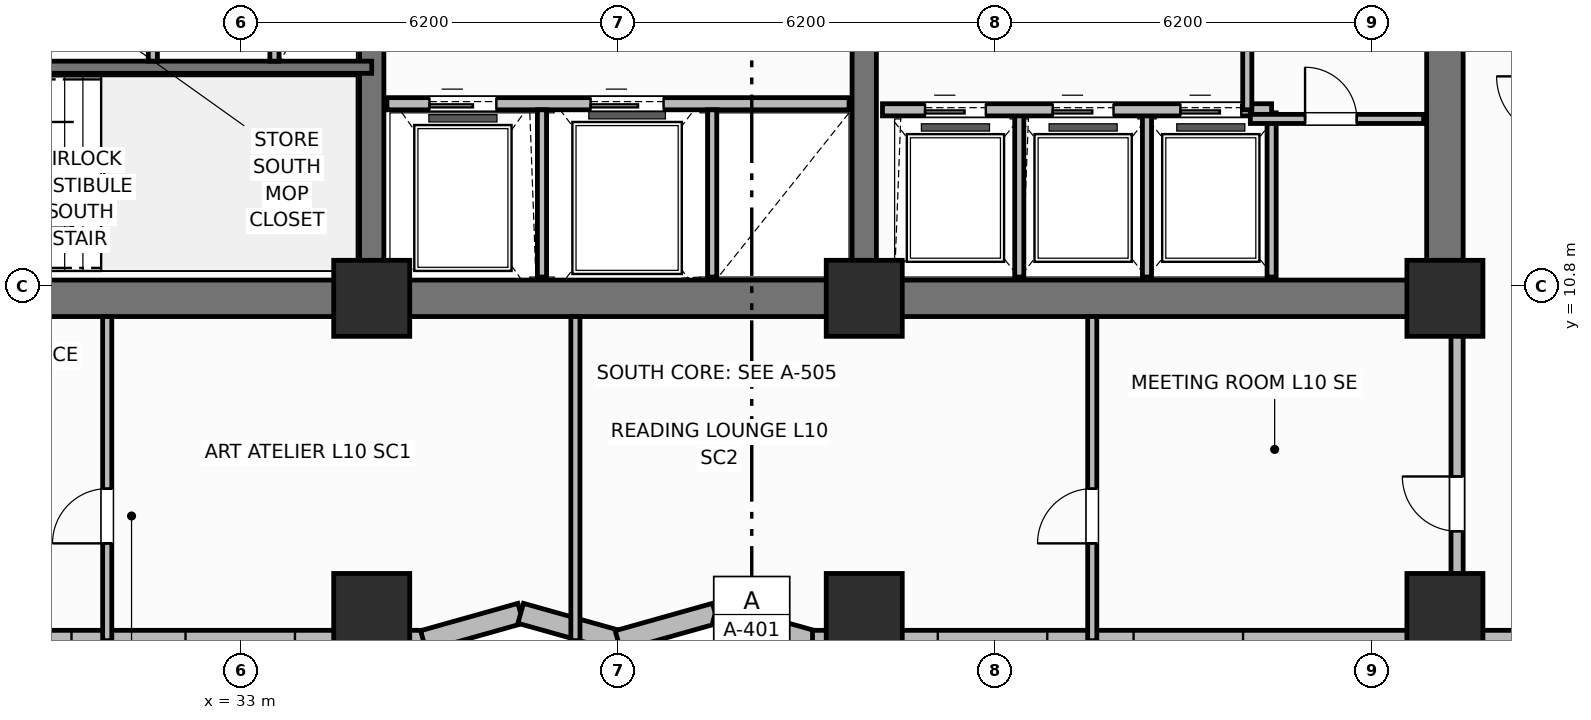
"""IFC4 building model, lengths in metres.
Left out: names, types, materials, properties, quantities, classifications, styles, units other than length and angle.
Written with IfcOpenShell. Run it as: python <this file> out.ifc"""

import sys

from ifc_helpers import new_model, si_unit, direction, frame, frame_2d, origin, origin_2d, place, context, subcontext, project, spatial, rectangle, extrude, element, fill, save


model = new_model("IFC4")
c1 = context("Model", 3, precision=1e-05, world=origin(), true_north=direction((0.0, 1.0)))
c2 = subcontext(c1, "Body", "Model", "MODEL_VIEW")
j1 = project(units=[si_unit("LENGTHUNIT", "METRE"), si_unit("PLANEANGLEUNIT", "RADIAN")], contexts=[c1])
p1 = place(None, origin())
s1 = spatial("IfcSite", under=j1, at=p1, CompositionType="ELEMENT")
p2 = place(p1, origin())
s2 = spatial("IfcBuilding", under=s1, at=p2, CompositionType="ELEMENT")
p3 = place(p2, frame((0.0, 0.0, 43.6)))
s3 = spatial("IfcBuildingStorey", under=s2, at=p3, CompositionType="ELEMENT", Elevation=43.6)
p4 = place(p3, frame((52.8, 10.6, 0.0), z_axis=(0.0, 0.0, 1.0), x_axis=(-1.0, 0.0, 0.0)))
e1 = element("IfcWall", 1, at=p4, inside=s3, PredefinedType="SHEAR", context=c2, shape_type="SweptSolid", body=[
    extrude(rectangle(XDim=27.2, YDim=0.6, at=frame_2d((13.6, 0.0))), origin(), (0.0, 0.0, 1.0), 3.7),
])
p5 = place(p3, frame((52.8, 10.9, 0.0), z_axis=(0.0, 0.0, 1.0), x_axis=(0.0, 1.0, 0.0)))
e2 = element("IfcWall", 2, at=p5, inside=s3, PredefinedType="SHEAR", context=c2, shape_type="SweptSolid", body=[
    extrude(rectangle(XDim=5.6, YDim=0.6, at=frame_2d((2.8, 0.0))), origin(), (0.0, 0.0, 1.0), 3.7),
])
for number, where, z_axis, x_axis in (
    (3, (35.15, 10.9, 0.0), (0.0, 0.0, 1.0), (0.0, 1.0, 0.0)),
    (4, (43.25, 10.9, 0.0), (0.0, 0.0, 1.0), (0.0, 1.0, 0.0)),
):
    element("IfcWall", number, at=place(p3, frame(where, z_axis=z_axis, x_axis=x_axis)), inside=s3, PredefinedType="SHEAR", context=c2, shape_type="SweptSolid", body=[
        extrude(rectangle(XDim=5.6, YDim=0.4, at=frame_2d((2.8, 0.0))), origin(), (0.0, 0.0, 1.0), 3.7),
    ])
for number, where, z_axis, x_axis in (
    (5, (35.15, 10.6, 0.0), (0.0, 0.0, 1.0), (1.0, 0.0, 0.0)),
    (6, (43.25, 10.6, 0.0), (0.0, 0.0, 1.0), (1.0, 0.0, 0.0)),
    (7, (52.8, 10.6, 0.0), (0.0, 0.0, 1.0), (1.0, 0.0, 0.0)),
    (8, (35.15, 5.45, 0.0), (0.0, 0.0, 1.0), (1.0, 0.0, 0.0)),
    (9, (43.25, 5.45, 0.0), (0.0, 0.0, 1.0), (1.0, 0.0, 0.0)),
    (10, (52.8, 5.45, 0.0), (0.0, 0.0, 1.0), (1.0, 0.0, 0.0)),
):
    element("IfcColumn", number, at=place(p3, frame(where, z_axis=z_axis, x_axis=x_axis)), inside=s3, PredefinedType="COLUMN", context=c2, shape_type="SweptSolid", body=[
        extrude(rectangle(XDim=1.25, YDim=1.25, at=origin_2d()), origin(), (0.0, 0.0, 1.0), 3.7),
    ])
p6 = place(p3, frame((18.6, 4.97, 0.0), z_axis=(0.0, 0.0, 1.0), x_axis=(1.0, 0.0, 0.0)))
e11 = element("IfcWall", 11, at=p6, inside=s3, PredefinedType="SOLIDWALL", context=c2, shape_type="SweptSolid", body=[
    extrude(rectangle(XDim=17.4, YDim=0.34, at=frame_2d((8.7, 0.0))), origin(), (0.0, 0.0, 1.0), 2.7),
])
p7 = place(p6, frame((1.762, 0.0, 0.73)))
e12 = element("IfcOpeningElement", 12, at=p7, cuts=e11, PredefinedType="OPENING", context=c2, shape_type="SweptSolid", body=[
    extrude(rectangle(XDim=1.8, YDim=1.85, at=frame_2d((0.9, 0.925))), frame((0.0, 0.18, 0.0), z_axis=(0.0, -1.0, 0.0), x_axis=(1.0, 0.0, 0.0)), (0.0, 0.0, 1.0), 0.36),
])
p8 = place(p6, frame((9.812, 0.0, 0.73)))
e13 = element("IfcOpeningElement", 13, at=p8, cuts=e11, PredefinedType="OPENING", context=c2, shape_type="SweptSolid", body=[
    extrude(rectangle(XDim=1.8, YDim=1.85, at=frame_2d((0.9, 0.925))), frame((0.0, 0.18, 0.0), z_axis=(0.0, -1.0, 0.0), x_axis=(1.0, 0.0, 0.0)), (0.0, 0.0, 1.0), 0.36),
])
p9 = place(p6, frame((13.488, 0.0, 0.73)))
e14 = element("IfcOpeningElement", 14, at=p9, cuts=e11, PredefinedType="OPENING", context=c2, shape_type="SweptSolid", body=[
    extrude(rectangle(XDim=1.8, YDim=1.85, at=frame_2d((0.9, 0.925))), frame((0.0, 0.18, 0.0), z_axis=(0.0, -1.0, 0.0), x_axis=(1.0, 0.0, 0.0)), (0.0, 0.0, 1.0), 0.36),
])
p10 = place(p3, frame((36.0, 4.97, 0.0), z_axis=(0.0, 0.0, 1.0), x_axis=(0.962662902433, 0.270703040766, 0.0)))
e15 = element("IfcWall", 15, at=p10, inside=s3, PredefinedType="SOLIDWALL", context=c2, shape_type="SweptSolid", body=[
    extrude(rectangle(XDim=1.662, YDim=0.34, at=frame_2d((0.831, 0.0))), origin(), (0.0, 0.0, 1.0), 2.7),
])
p11 = place(p3, frame((37.6, 5.42, 0.0), z_axis=(0.0, 0.0, 1.0), x_axis=(0.962652136636, -0.270741322725, 0.0)))
e16 = element("IfcWall", 16, at=p11, inside=s3, PredefinedType="SOLIDWALL", context=c2, shape_type="SweptSolid", body=[
    extrude(rectangle(XDim=1.662, YDim=0.34, at=frame_2d((0.831, 0.0))), origin(), (0.0, 0.0, 1.0), 2.7),
])
p12 = place(p3, frame((39.2, 4.97, 0.0), z_axis=(0.0, 0.0, 1.0), x_axis=(0.962662902433, 0.270703040766, 0.0)))
e17 = element("IfcWall", 17, at=p12, inside=s3, PredefinedType="SOLIDWALL", context=c2, shape_type="SweptSolid", body=[
    extrude(rectangle(XDim=1.662, YDim=0.34, at=frame_2d((0.831, 0.0))), origin(), (0.0, 0.0, 1.0), 2.7),
])
p13 = place(p3, frame((40.8, 5.42, 0.0), z_axis=(0.0, 0.0, 1.0), x_axis=(0.962652136636, -0.270741322725, 0.0)))
e18 = element("IfcWall", 18, at=p13, inside=s3, PredefinedType="SOLIDWALL", context=c2, shape_type="SweptSolid", body=[
    extrude(rectangle(XDim=1.662, YDim=0.34, at=frame_2d((0.831, 0.0))), origin(), (0.0, 0.0, 1.0), 2.7),
])
p14 = place(p3, frame((42.4, 4.97, 0.0), z_axis=(0.0, 0.0, 1.0), x_axis=(1.0, 0.0, 0.0)))
e19 = element("IfcWall", 19, at=p14, inside=s3, PredefinedType="SOLIDWALL", context=c2, shape_type="SweptSolid", body=[
    extrude(rectangle(XDim=17.4, YDim=0.34, at=frame_2d((8.7, 0.0))), origin(), (0.0, 0.0, 1.0), 2.7),
])
p15 = place(p14, frame((2.06, 0.0, 0.73)))
e20 = element("IfcOpeningElement", 20, at=p15, cuts=e19, PredefinedType="OPENING", context=c2, shape_type="SweptSolid", body=[
    extrude(rectangle(XDim=1.8, YDim=1.85, at=frame_2d((0.9, 0.925))), frame((0.0, 0.18, 0.0), z_axis=(0.0, -1.0, 0.0), x_axis=(1.0, 0.0, 0.0)), (0.0, 0.0, 1.0), 0.36),
])
p16 = place(p14, frame((5.28, 0.0, 0.73)))
e21 = element("IfcOpeningElement", 21, at=p16, cuts=e19, PredefinedType="OPENING", context=c2, shape_type="SweptSolid", body=[
    extrude(rectangle(XDim=1.8, YDim=1.85, at=frame_2d((0.9, 0.925))), frame((0.0, 0.18, 0.0), z_axis=(0.0, -1.0, 0.0), x_axis=(1.0, 0.0, 0.0)), (0.0, 0.0, 1.0), 0.36),
])
p17 = place(p14, frame((14.24, 0.0, 0.73)))
e22 = element("IfcOpeningElement", 22, at=p17, cuts=e19, PredefinedType="OPENING", context=c2, shape_type="SweptSolid", body=[
    extrude(rectangle(XDim=1.8, YDim=1.85, at=frame_2d((0.9, 0.925))), frame((0.0, 0.18, 0.0), z_axis=(0.0, -1.0, 0.0), x_axis=(1.0, 0.0, 0.0)), (0.0, 0.0, 1.0), 0.36),
])
p18 = place(p3, frame((25.6, 14.4, 0.0), z_axis=(0.0, 0.0, 1.0), x_axis=(1.0, 0.0, 0.0)))
e23 = element("IfcWall", 23, at=p18, inside=s3, PredefinedType="SHEAR", context=c2, shape_type="SweptSolid", body=[
    extrude(rectangle(XDim=9.55, YDim=0.2, at=frame_2d((4.775, 0.0))), origin(), (0.0, 0.0, 1.0), 3.7),
])
p19 = place(p18, frame((1.05, 0.0, 0.0)))
e24 = element("IfcOpeningElement", 24, at=p19, cuts=e23, PredefinedType="OPENING", context=c2, shape_type="SweptSolid", body=[
    extrude(rectangle(XDim=1.1, YDim=2.15, at=frame_2d((0.55, 1.075))), frame((0.0, 0.11, 0.0), z_axis=(0.0, -1.0, 0.0), x_axis=(1.0, 0.0, 0.0)), (0.0, 0.0, 1.0), 0.22),
])
p20 = place(p3, frame((31.55, 14.5, 0.0), z_axis=(0.0, 0.0, 1.0), x_axis=(0.0, 1.0, 0.0)))
e25 = element("IfcWall", 25, at=p20, inside=s3, PredefinedType="PARTITIONING", context=c2, shape_type="SweptSolid", body=[
    extrude(rectangle(XDim=2.08, YDim=0.15, at=frame_2d((1.04, 0.0))), origin(), (0.0, 0.0, 1.0), 2.53),
])
p21 = place(p3, frame((33.55, 14.5, 0.0), z_axis=(0.0, 0.0, 1.0), x_axis=(0.0, 1.0, 0.0)))
e26 = element("IfcWall", 26, at=p21, inside=s3, PredefinedType="PARTITIONING", context=c2, shape_type="SweptSolid", body=[
    extrude(rectangle(XDim=2.08, YDim=0.15, at=frame_2d((1.04, 0.0))), origin(), (0.0, 0.0, 1.0), 2.53),
])
p22 = place(p21, frame((0.55, 0.0, 0.0)))
e27 = element("IfcOpeningElement", 27, at=p22, cuts=e26, PredefinedType="OPENING", context=c2, shape_type="SweptSolid", body=[
    extrude(rectangle(XDim=0.85, YDim=2.05, at=frame_2d((0.425, 1.025))), frame((0.0, 0.085, 0.0), z_axis=(0.0, -1.0, 0.0), x_axis=(1.0, 0.0, 0.0)), (0.0, 0.0, 1.0), 0.17),
])
p23 = place(p3, frame((35.4, 13.8, 0.0), z_axis=(0.0, 0.0, 1.0), x_axis=(1.0, 0.0, 0.0)))
e28 = element("IfcWall", 28, at=p23, inside=s3, PredefinedType="PARTITIONING", context=c2, shape_type="SweptSolid", body=[
    extrude(rectangle(XDim=7.6, YDim=0.2, at=frame_2d((3.8, 0.0))), origin(), (0.0, 0.0, 1.0), 2.3),
])
p24 = place(p23, frame((0.7, 0.0, 0.0)))
e29 = element("IfcOpeningElement", 29, at=p24, cuts=e28, PredefinedType="OPENING", context=c2, shape_type="SweptSolid", body=[
    extrude(rectangle(XDim=1.1, YDim=2.15, at=frame_2d((0.55, 1.075))), frame((0.0, 0.11, 0.0), z_axis=(0.0, -1.0, 0.0), x_axis=(1.0, 0.0, 0.0)), (0.0, 0.0, 1.0), 0.22),
])
p25 = place(p23, frame((3.35, 0.0, 0.0)))
e30 = element("IfcOpeningElement", 30, at=p25, cuts=e28, PredefinedType="OPENING", context=c2, shape_type="SweptSolid", body=[
    extrude(rectangle(XDim=1.2, YDim=2.15, at=frame_2d((0.6, 1.075))), frame((0.0, 0.11, 0.0), z_axis=(0.0, -1.0, 0.0), x_axis=(1.0, 0.0, 0.0)), (0.0, 0.0, 1.0), 0.22),
])
for number, where, z_axis, x_axis in (
    (31, (37.95, 10.95, 0.0), (0.0, 0.0, 1.0), (0.0, 1.0, 0.0)),
    (32, (40.75, 10.95, 0.0), (0.0, 0.0, 1.0), (0.0, 1.0, 0.0)),
):
    element("IfcWall", number, at=place(p3, frame(where, z_axis=z_axis, x_axis=x_axis)), inside=s3, PredefinedType="PARTITIONING", context=c2, shape_type="SweptSolid", body=[
        extrude(rectangle(XDim=2.75, YDim=0.15, at=frame_2d((1.375, 0.0))), origin(), (0.0, 0.0, 1.0), 2.53),
    ])
for number, where, z_axis, x_axis in (
    (33, (45.8, 10.95, 0.0), (0.0, 0.0, 1.0), (0.0, 1.0, 0.0)),
    (34, (47.9, 10.95, 0.0), (0.0, 0.0, 1.0), (0.0, 1.0, 0.0)),
    (35, (49.95, 10.95, 0.0), (0.0, 0.0, 1.0), (0.0, 1.0, 0.0)),
):
    element("IfcWall", number, at=place(p3, frame(where, z_axis=z_axis, x_axis=x_axis)), inside=s3, PredefinedType="PARTITIONING", context=c2, shape_type="SweptSolid", body=[
        extrude(rectangle(XDim=2.7, YDim=0.15, at=frame_2d((1.35, 0.0))), origin(), (0.0, 0.0, 1.0), 2.53),
    ])
p26 = place(p3, frame((43.55, 13.7, 0.0), z_axis=(0.0, 0.0, 1.0), x_axis=(1.0, 0.0, 0.0)))
e36 = element("IfcWall", 36, at=p26, inside=s3, PredefinedType="PARTITIONING", context=c2, shape_type="SweptSolid", body=[
    extrude(rectangle(XDim=6.4, YDim=0.2, at=frame_2d((3.2, 0.0))), origin(), (0.0, 0.0, 1.0), 2.53),
])
p27 = place(p26, frame((0.7, 0.0, 0.0)))
e37 = element("IfcOpeningElement", 37, at=p27, cuts=e36, PredefinedType="OPENING", context=c2, shape_type="SweptSolid", body=[
    extrude(rectangle(XDim=1.0, YDim=2.15, at=frame_2d((0.5, 1.075))), frame((0.0, 0.11, 0.0), z_axis=(0.0, -1.0, 0.0), x_axis=(1.0, 0.0, 0.0)), (0.0, 0.0, 1.0), 0.22),
])
p28 = place(p26, frame((2.8, 0.0, 0.0)))
e38 = element("IfcOpeningElement", 38, at=p28, cuts=e36, PredefinedType="OPENING", context=c2, shape_type="SweptSolid", body=[
    extrude(rectangle(XDim=1.0, YDim=2.15, at=frame_2d((0.5, 1.075))), frame((0.0, 0.11, 0.0), z_axis=(0.0, -1.0, 0.0), x_axis=(1.0, 0.0, 0.0)), (0.0, 0.0, 1.0), 0.22),
])
p29 = place(p26, frame((4.9, 0.0, 0.0)))
e39 = element("IfcOpeningElement", 39, at=p29, cuts=e36, PredefinedType="OPENING", context=c2, shape_type="SweptSolid", body=[
    extrude(rectangle(XDim=1.0, YDim=2.15, at=frame_2d((0.5, 1.075))), frame((0.0, 0.11, 0.0), z_axis=(0.0, -1.0, 0.0), x_axis=(1.0, 0.0, 0.0)), (0.0, 0.0, 1.0), 0.22),
])
p30 = place(p3, frame((49.55, 13.7, 0.0), z_axis=(0.0, 0.0, 1.0), x_axis=(0.0, 1.0, 0.0)))
e40 = element("IfcWall", 40, at=p30, inside=s3, PredefinedType="PARTITIONING", context=c2, shape_type="SweptSolid", body=[
    extrude(rectangle(XDim=2.88, YDim=0.15, at=frame_2d((1.44, 0.0))), origin(), (0.0, 0.0, 1.0), 2.53),
])
p31 = place(p3, frame((49.6, 13.55, 0.0), z_axis=(0.0, 0.0, 1.0), x_axis=(1.0, 0.0, 0.0)))
e41 = element("IfcWall", 41, at=p31, inside=s3, PredefinedType="PARTITIONING", context=c2, shape_type="SweptSolid", body=[
    extrude(rectangle(XDim=2.85, YDim=0.15, at=frame_2d((1.425, 0.0))), origin(), (0.0, 0.0, 1.0), 2.53),
])
p32 = place(p31, frame((0.9, 0.0, 0.0)))
e42 = element("IfcOpeningElement", 42, at=p32, cuts=e41, PredefinedType="OPENING", context=c2, shape_type="SweptSolid", body=[
    extrude(rectangle(XDim=0.85, YDim=2.1, at=frame_2d((0.425, 1.05))), frame((0.0, 0.085, 0.0), z_axis=(0.0, -1.0, 0.0), x_axis=(1.0, 0.0, 0.0)), (0.0, 0.0, 1.0), 0.17),
])
p33 = place(p3, frame((30.8, 4.97, 0.0), z_axis=(0.0, 0.0, 1.0), x_axis=(0.0, 1.0, 0.0)))
e43 = element("IfcWall", 43, at=p33, inside=s3, PredefinedType="PARTITIONING", context=c2, shape_type="SweptSolid", body=[
    extrude(rectangle(XDim=5.33, YDim=0.15, at=frame_2d((2.665, 0.0))), origin(), (0.0, 0.0, 1.0), 2.53),
])
p34 = place(p33, frame((1.6, 0.0, 0.0)))
e44 = element("IfcOpeningElement", 44, at=p34, cuts=e43, PredefinedType="OPENING", context=c2, shape_type="SweptSolid", body=[
    extrude(rectangle(XDim=0.9, YDim=2.1, at=frame_2d((0.45, 1.05))), frame((0.0, 0.085, 0.0), z_axis=(0.0, -1.0, 0.0), x_axis=(1.0, 0.0, 0.0)), (0.0, 0.0, 1.0), 0.17),
])
p35 = place(p3, frame((38.5, 4.97, 0.0), z_axis=(0.0, 0.0, 1.0), x_axis=(0.0, 1.0, 0.0)))
e45 = element("IfcWall", 45, at=p35, inside=s3, PredefinedType="PARTITIONING", context=c2, shape_type="SweptSolid", body=[
    extrude(rectangle(XDim=5.33, YDim=0.15, at=frame_2d((2.665, 0.0))), origin(), (0.0, 0.0, 1.0), 2.53),
])
p36 = place(p3, frame((47.0, 4.97, 0.0), z_axis=(0.0, 0.0, 1.0), x_axis=(0.0, 1.0, 0.0)))
e46 = element("IfcWall", 46, at=p36, inside=s3, PredefinedType="PARTITIONING", context=c2, shape_type="SweptSolid", body=[
    extrude(rectangle(XDim=5.33, YDim=0.15, at=frame_2d((2.665, 0.0))), origin(), (0.0, 0.0, 1.0), 2.53),
])
p37 = place(p36, frame((1.6, 0.0, 0.0)))
e47 = element("IfcOpeningElement", 47, at=p37, cuts=e46, PredefinedType="OPENING", context=c2, shape_type="SweptSolid", body=[
    extrude(rectangle(XDim=0.9, YDim=2.1, at=frame_2d((0.45, 1.05))), frame((0.0, 0.085, 0.0), z_axis=(0.0, -1.0, 0.0), x_axis=(1.0, 0.0, 0.0)), (0.0, 0.0, 1.0), 0.17),
])
p38 = place(p3, frame((53.0, 5.92, 0.0), z_axis=(0.0, 0.0, 1.0), x_axis=(0.0, 1.0, 0.0)))
e48 = element("IfcWall", 48, at=p38, inside=s3, PredefinedType="PARTITIONING", context=c2, shape_type="SweptSolid", body=[
    extrude(rectangle(XDim=4.38, YDim=0.2, at=frame_2d((2.19, 0.0))), origin(), (0.0, 0.0, 1.0), 2.53),
])
p39 = place(p38, frame((0.85, 0.0, 0.0)))
e49 = element("IfcOpeningElement", 49, at=p39, cuts=e48, PredefinedType="OPENING", context=c2, shape_type="SweptSolid", body=[
    extrude(rectangle(XDim=0.9, YDim=2.1, at=frame_2d((0.45, 1.05))), frame((0.0, 0.11, 0.0), z_axis=(0.0, -1.0, 0.0), x_axis=(1.0, 0.0, 0.0)), (0.0, 0.0, 1.0), 0.22),
])
p40 = place(p8, origin())
e50 = element("IfcWindow", 50, at=p40, inside=s3, PartitioningType="SINGLE_PANEL", PredefinedType="WINDOW", context=c2, shape_type="SweptSolid", body=[
    extrude(rectangle(XDim=1.8, YDim=1.85, at=frame_2d((0.9, 0.925))), frame((0.0, 0.03, 0.0), z_axis=(0.0, -1.0, 0.0), x_axis=(1.0, 0.0, 0.0)), (0.0, 0.0, 1.0), 0.06),
])
fill(e13, e50)
p41 = place(p9, origin())
e51 = element("IfcWindow", 51, at=p41, inside=s3, PartitioningType="SINGLE_PANEL", PredefinedType="WINDOW", context=c2, shape_type="SweptSolid", body=[
    extrude(rectangle(XDim=1.8, YDim=1.85, at=frame_2d((0.9, 0.925))), frame((0.0, 0.03, 0.0), z_axis=(0.0, -1.0, 0.0), x_axis=(1.0, 0.0, 0.0)), (0.0, 0.0, 1.0), 0.06),
])
fill(e14, e51)
p42 = place(p15, origin())
e52 = element("IfcWindow", 52, at=p42, inside=s3, PartitioningType="SINGLE_PANEL", PredefinedType="WINDOW", context=c2, shape_type="SweptSolid", body=[
    extrude(rectangle(XDim=1.8, YDim=1.85, at=frame_2d((0.9, 0.925))), frame((0.0, 0.03, 0.0), z_axis=(0.0, -1.0, 0.0), x_axis=(1.0, 0.0, 0.0)), (0.0, 0.0, 1.0), 0.06),
])
fill(e20, e52)
p43 = place(p16, origin())
e53 = element("IfcWindow", 53, at=p43, inside=s3, PartitioningType="SINGLE_PANEL", PredefinedType="WINDOW", context=c2, shape_type="SweptSolid", body=[
    extrude(rectangle(XDim=1.8, YDim=1.85, at=frame_2d((0.9, 0.925))), frame((0.0, 0.03, 0.0), z_axis=(0.0, -1.0, 0.0), x_axis=(1.0, 0.0, 0.0)), (0.0, 0.0, 1.0), 0.06),
])
fill(e21, e53)
p44 = place(p24, origin())
e54 = element("IfcDoor", 54, at=p44, inside=s3, OperationType="SLIDING_TO_LEFT", PredefinedType="DOOR", context=c2, shape_type="SweptSolid", body=[
    extrude(rectangle(XDim=1.1, YDim=2.15, at=frame_2d((0.55, 1.075))), frame((0.0, 0.025, 0.0), z_axis=(0.0, -1.0, 0.0), x_axis=(1.0, 0.0, 0.0)), (0.0, 0.0, 1.0), 0.05),
])
fill(e29, e54)
p45 = place(p25, origin())
e55 = element("IfcDoor", 55, at=p45, inside=s3, OperationType="SLIDING_TO_LEFT", PredefinedType="DOOR", context=c2, shape_type="SweptSolid", body=[
    extrude(rectangle(XDim=1.2, YDim=2.15, at=frame_2d((0.6, 1.075))), frame((0.0, 0.025, 0.0), z_axis=(0.0, -1.0, 0.0), x_axis=(1.0, 0.0, 0.0)), (0.0, 0.0, 1.0), 0.05),
])
fill(e30, e55)
p46 = place(p27, origin())
e56 = element("IfcDoor", 56, at=p46, inside=s3, OperationType="SLIDING_TO_LEFT", PredefinedType="DOOR", context=c2, shape_type="SweptSolid", body=[
    extrude(rectangle(XDim=1.0, YDim=2.15, at=frame_2d((0.5, 1.075))), frame((0.0, 0.025, 0.0), z_axis=(0.0, -1.0, 0.0), x_axis=(1.0, 0.0, 0.0)), (0.0, 0.0, 1.0), 0.05),
])
fill(e37, e56)
p47 = place(p28, origin())
e57 = element("IfcDoor", 57, at=p47, inside=s3, OperationType="SLIDING_TO_LEFT", PredefinedType="DOOR", context=c2, shape_type="SweptSolid", body=[
    extrude(rectangle(XDim=1.0, YDim=2.15, at=frame_2d((0.5, 1.075))), frame((0.0, 0.025, 0.0), z_axis=(0.0, -1.0, 0.0), x_axis=(1.0, 0.0, 0.0)), (0.0, 0.0, 1.0), 0.05),
])
fill(e38, e57)
p48 = place(p29, origin())
e58 = element("IfcDoor", 58, at=p48, inside=s3, OperationType="SLIDING_TO_LEFT", PredefinedType="DOOR", context=c2, shape_type="SweptSolid", body=[
    extrude(rectangle(XDim=1.0, YDim=2.15, at=frame_2d((0.5, 1.075))), frame((0.0, 0.025, 0.0), z_axis=(0.0, -1.0, 0.0), x_axis=(1.0, 0.0, 0.0)), (0.0, 0.0, 1.0), 0.05),
])
fill(e39, e58)
p49 = place(p32, origin())
e59 = element("IfcDoor", 59, at=p49, inside=s3, OperationType="SINGLE_SWING_LEFT", PredefinedType="DOOR", context=c2, shape_type="SweptSolid", body=[
    extrude(rectangle(XDim=0.85, YDim=2.1, at=frame_2d((0.425, 1.05))), frame((0.0, 0.025, 0.0), z_axis=(0.0, -1.0, 0.0), x_axis=(1.0, 0.0, 0.0)), (0.0, 0.0, 1.0), 0.05),
])
fill(e42, e59)
p50 = place(p34, origin())
e60 = element("IfcDoor", 60, at=p50, inside=s3, OperationType="SINGLE_SWING_LEFT", PredefinedType="DOOR", context=c2, shape_type="SweptSolid", body=[
    extrude(rectangle(XDim=0.9, YDim=2.1, at=frame_2d((0.45, 1.05))), frame((0.0, 0.025, 0.0), z_axis=(0.0, -1.0, 0.0), x_axis=(1.0, 0.0, 0.0)), (0.0, 0.0, 1.0), 0.05),
])
fill(e44, e60)
p51 = place(p37, origin())
e61 = element("IfcDoor", 61, at=p51, inside=s3, OperationType="SINGLE_SWING_LEFT", PredefinedType="DOOR", context=c2, shape_type="SweptSolid", body=[
    extrude(rectangle(XDim=0.9, YDim=2.1, at=frame_2d((0.45, 1.05))), frame((0.0, 0.025, 0.0), z_axis=(0.0, -1.0, 0.0), x_axis=(1.0, 0.0, 0.0)), (0.0, 0.0, 1.0), 0.05),
])
fill(e47, e61)
p52 = place(p39, origin())
e62 = element("IfcDoor", 62, at=p52, inside=s3, OperationType="SINGLE_SWING_RIGHT", PredefinedType="DOOR", context=c2, shape_type="SweptSolid", body=[
    extrude(rectangle(XDim=0.9, YDim=2.1, at=frame_2d((0.45, 1.05))), frame((0.0, 0.025, 0.0), z_axis=(0.0, -1.0, 0.0), x_axis=(1.0, 0.0, 0.0)), (0.0, 0.0, 1.0), 0.05),
])
fill(e49, e62)
save(model, sys.argv[1])
